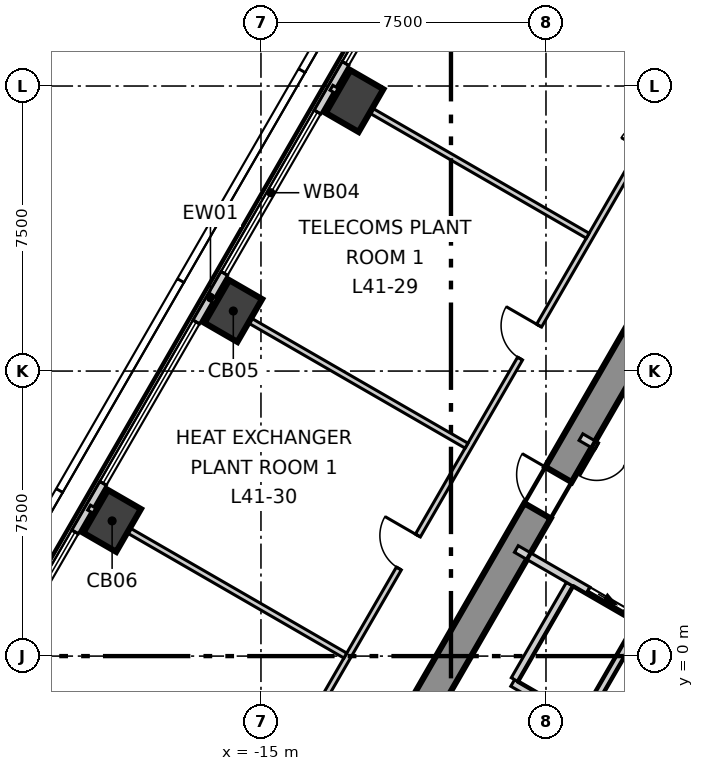
"""IFC4 building model, lengths in metres.
Left out: names, types, materials, properties, quantities, classifications, styles, units other than length and angle.
Written with IfcOpenShell. Run it as: python <this file> out.ifc"""

import sys

from ifc_helpers import new_model, si_unit, direction, frame, frame_2d, origin, origin_2d, place, context, subcontext, project, spatial, polyline, rectangle, outline, extrude, element, fill, save


model = new_model("IFC4")
c1 = context("Model", 3, precision=1e-05, world=origin(), true_north=direction((0.0, 1.0)))
c2 = subcontext(c1, "Body", "Model", "MODEL_VIEW")
j1 = project(units=[si_unit("LENGTHUNIT", "METRE"), si_unit("PLANEANGLEUNIT", "RADIAN")], contexts=[c1])
p1 = place(None, origin())
s1 = spatial("IfcSite", under=j1, at=p1, CompositionType="ELEMENT")
p2 = place(p1, origin())
s2 = spatial("IfcBuilding", under=s1, at=p2, CompositionType="ELEMENT")
p3 = place(p2, frame((0.0, 0.0, 176.3)))
s3 = spatial("IfcBuildingStorey", under=s2, at=p3, CompositionType="ELEMENT", Elevation=176.3)
p4 = place(p3, frame((-1.674, 14.3, -0.3), z_axis=(0.0, 0.0, 1.0), x_axis=(-0.499995765644, -0.866027848477, 0.0)))
e1 = element("IfcWall", 1, at=p4, inside=s3, PredefinedType="SHEAR", context=c2, shape_type="SweptSolid", body=[
    extrude(outline(polyline([(-0.231, -0.4), (1.732, -0.4), (3.695, -0.4), (5.658, -0.4), (7.621, -0.4), (9.584, -0.4), (11.547, -0.4), (13.51, -0.4), (15.473, -0.4), (17.436, -0.4), (19.399, -0.4), (21.362, -0.4), (23.325, -0.4), (22.863, 0.4), (20.977, 0.4), (19.091, 0.4), (17.205, 0.4), (15.319, 0.4), (13.433, 0.4), (11.547, 0.4), (9.661, 0.4), (7.775, 0.4), (5.889, 0.4), (4.003, 0.4), (2.117, 0.4), (0.231, 0.4), (-0.231, -0.4)])), origin(), (0.0, 0.0, 1.0), 4.2),
])
p5 = place(p4, frame((10.997, 0.0, 0.3)))
e2 = element("IfcOpeningElement", 2, at=p5, cuts=e1, PredefinedType="OPENING", context=c2, shape_type="SweptSolid", body=[
    extrude(rectangle(XDim=1.1, YDim=2.1, at=frame_2d((0.55, 1.05))), frame((0.0, 0.41, 0.0), z_axis=(0.0, -1.0, 0.0), x_axis=(1.0, 0.0, 0.0)), (0.0, 0.0, 1.0), 0.82),
])
for number, where, z_axis, x_axis in (
    (3, (-12.538, 14.604, -0.3), (0.0, 0.0, 1.0), (0.5, 0.866, 0.0)),
    (4, (-15.728, 9.08, -0.3), (0.0, 0.0, 1.0), (0.5, 0.866, 0.0)),
    (5, (-18.917, 3.557, -0.3), (0.0, 0.0, 1.0), (0.5, 0.866, 0.0)),
):
    element("IfcColumn", number, at=place(p3, frame(where, z_axis=z_axis, x_axis=x_axis)), inside=s3, PredefinedType="COLUMN", context=c2, shape_type="SweptSolid", body=[
        extrude(rectangle(XDim=1.3, YDim=1.0, at=origin_2d()), origin(), (0.0, 0.0, 1.0), 4.2),
    ])
p6 = place(p3, frame((-2.926, 32.654, 0.0), z_axis=(0.0, 0.0, 1.0), x_axis=(-0.499994049952, -0.866028839019, 0.0)))
e6 = element("IfcWall", 6, at=p6, inside=s3, PredefinedType="ELEMENTEDWALL", context=c2, shape_type="SweptSolid", body=[
    extrude(rectangle(XDim=53.613, YDim=0.2, at=frame_2d((26.806, 0.0))), origin(), (0.0, 0.0, 1.0), 3.9),
])
p7 = place(p6, frame((2.042, 0.0, 0.9)))
e7 = element("IfcOpeningElement", 7, at=p7, cuts=e6, PredefinedType="OPENING", context=c2, shape_type="SweptSolid", body=[
    extrude(rectangle(XDim=4.9, YDim=2.5, at=frame_2d((2.45, 1.25))), frame((0.0, 0.11, 0.0), z_axis=(0.0, -1.0, 0.0), x_axis=(1.0, 0.0, 0.0)), (0.0, 0.0, 1.0), 0.22),
])
p8 = place(p6, frame((8.42, 0.0, 0.9)))
e8 = element("IfcOpeningElement", 8, at=p8, cuts=e6, PredefinedType="OPENING", context=c2, shape_type="SweptSolid", body=[
    extrude(rectangle(XDim=4.9, YDim=2.5, at=frame_2d((2.45, 1.25))), frame((0.0, 0.11, 0.0), z_axis=(0.0, -1.0, 0.0), x_axis=(1.0, 0.0, 0.0)), (0.0, 0.0, 1.0), 0.22),
])
p9 = place(p6, frame((14.798, 0.0, 0.9)))
e9 = element("IfcOpeningElement", 9, at=p9, cuts=e6, PredefinedType="OPENING", context=c2, shape_type="SweptSolid", body=[
    extrude(rectangle(XDim=4.9, YDim=2.5, at=frame_2d((2.45, 1.25))), frame((0.0, 0.11, 0.0), z_axis=(0.0, -1.0, 0.0), x_axis=(1.0, 0.0, 0.0)), (0.0, 0.0, 1.0), 0.22),
])
p10 = place(p6, frame((21.177, 0.0, 0.9)))
e10 = element("IfcOpeningElement", 10, at=p10, cuts=e6, PredefinedType="OPENING", context=c2, shape_type="SweptSolid", body=[
    extrude(rectangle(XDim=4.9, YDim=2.5, at=frame_2d((2.45, 1.25))), frame((0.0, 0.11, 0.0), z_axis=(0.0, -1.0, 0.0), x_axis=(1.0, 0.0, 0.0)), (0.0, 0.0, 1.0), 0.22),
])
p11 = place(p6, frame((27.555, 0.0, 0.9)))
e11 = element("IfcOpeningElement", 11, at=p11, cuts=e6, PredefinedType="OPENING", context=c2, shape_type="SweptSolid", body=[
    extrude(rectangle(XDim=4.9, YDim=2.5, at=frame_2d((2.45, 1.25))), frame((0.0, 0.11, 0.0), z_axis=(0.0, -1.0, 0.0), x_axis=(1.0, 0.0, 0.0)), (0.0, 0.0, 1.0), 0.22),
])
p12 = place(p6, frame((33.934, 0.0, 0.9)))
e12 = element("IfcOpeningElement", 12, at=p12, cuts=e6, PredefinedType="OPENING", context=c2, shape_type="SweptSolid", body=[
    extrude(rectangle(XDim=4.9, YDim=2.5, at=frame_2d((2.45, 1.25))), frame((0.0, 0.11, 0.0), z_axis=(0.0, -1.0, 0.0), x_axis=(1.0, 0.0, 0.0)), (0.0, 0.0, 1.0), 0.22),
])
p13 = place(p6, frame((40.312, 0.0, 0.9)))
e13 = element("IfcOpeningElement", 13, at=p13, cuts=e6, PredefinedType="OPENING", context=c2, shape_type="SweptSolid", body=[
    extrude(rectangle(XDim=4.9, YDim=2.5, at=frame_2d((2.45, 1.25))), frame((0.0, 0.11, 0.0), z_axis=(0.0, -1.0, 0.0), x_axis=(1.0, 0.0, 0.0)), (0.0, 0.0, 1.0), 0.22),
])
p14 = place(p6, frame((46.69, 0.0, 0.9)))
e14 = element("IfcOpeningElement", 14, at=p14, cuts=e6, PredefinedType="OPENING", context=c2, shape_type="SweptSolid", body=[
    extrude(rectangle(XDim=4.9, YDim=2.5, at=frame_2d((2.45, 1.25))), frame((0.0, 0.11, 0.0), z_axis=(0.0, -1.0, 0.0), x_axis=(1.0, 0.0, 0.0)), (0.0, 0.0, 1.0), 0.22),
])
p15 = place(p3, frame((-15.993, -5.7, 0.0), z_axis=(0.0, 0.0, 1.0), x_axis=(0.500007877715, 0.866020855536, 0.0)))
e15 = element("IfcWall", 15, at=p15, inside=s3, PredefinedType="PARTITIONING", context=c2, shape_type="SweptSolid", body=[
    extrude(rectangle(XDim=25.865, YDim=0.15, at=frame_2d((12.933, 0.0))), origin(), (0.0, 0.0, 1.0), 3.9),
])
p16 = place(p15, frame((21.988, 0.0, 0.0)))
e16 = element("IfcOpeningElement", 16, at=p16, cuts=e15, PredefinedType="OPENING", context=c2, shape_type="SweptSolid", body=[
    extrude(rectangle(XDim=1.2, YDim=2.1, at=frame_2d((0.6, 1.05))), frame((0.0, 0.085, 0.0), z_axis=(0.0, -1.0, 0.0), x_axis=(1.0, 0.0, 0.0)), (0.0, 0.0, 1.0), 0.17),
])
p17 = place(p15, frame((15.622, 0.0, 0.0)))
e17 = element("IfcOpeningElement", 17, at=p17, cuts=e15, PredefinedType="OPENING", context=c2, shape_type="SweptSolid", body=[
    extrude(rectangle(XDim=1.0, YDim=2.1, at=frame_2d((0.5, 1.05))), frame((0.0, 0.085, 0.0), z_axis=(0.0, -1.0, 0.0), x_axis=(1.0, 0.0, 0.0)), (0.0, 0.0, 1.0), 0.17),
])
p18 = place(p15, frame((9.244, 0.0, 0.0)))
e18 = element("IfcOpeningElement", 18, at=p18, cuts=e15, PredefinedType="OPENING", context=c2, shape_type="SweptSolid", body=[
    extrude(rectangle(XDim=1.0, YDim=2.1, at=frame_2d((0.5, 1.05))), frame((0.0, 0.085, 0.0), z_axis=(0.0, -1.0, 0.0), x_axis=(1.0, 0.0, 0.0)), (0.0, 0.0, 1.0), 0.17),
])
p19 = place(p15, frame((2.678, 0.0, 0.0)))
e19 = element("IfcOpeningElement", 19, at=p19, cuts=e15, PredefinedType="OPENING", context=c2, shape_type="SweptSolid", body=[
    extrude(rectangle(XDim=1.2, YDim=2.1, at=frame_2d((0.6, 1.05))), frame((0.0, 0.085, 0.0), z_axis=(0.0, -1.0, 0.0), x_axis=(1.0, 0.0, 0.0)), (0.0, 0.0, 1.0), 0.17),
])
p20 = place(p3, frame((-19.523, 3.907, 0.0), z_axis=(0.0, 0.0, 1.0), x_axis=(0.866023191782, -0.500003831281, 0.0)))
e20 = element("IfcWall", 20, at=p20, inside=s3, PredefinedType="PARTITIONING", context=c2, shape_type="SweptSolid", body=[
    extrude(rectangle(XDim=7.786, YDim=0.15, at=frame_2d((3.893, 0.0))), origin(), (0.0, 0.0, 1.0), 3.9),
])
p21 = place(p3, frame((-16.334, 9.43, 0.0), z_axis=(0.0, 0.0, 1.0), x_axis=(0.86603676932, -0.499980313799, 0.0)))
e21 = element("IfcWall", 21, at=p21, inside=s3, PredefinedType="PARTITIONING", context=c2, shape_type="SweptSolid", body=[
    extrude(rectangle(XDim=7.786, YDim=0.15, at=frame_2d((3.893, 0.0))), origin(), (0.0, 0.0, 1.0), 3.4),
])
p22 = place(p3, frame((-13.145, 14.954, 0.0), z_axis=(0.0, 0.0, 1.0), x_axis=(0.866023191782, -0.500003831281, 0.0)))
e22 = element("IfcWall", 22, at=p22, inside=s3, PredefinedType="PARTITIONING", context=c2, shape_type="SweptSolid", body=[
    extrude(rectangle(XDim=7.786, YDim=0.15, at=frame_2d((3.893, 0.0))), origin(), (0.0, 0.0, 1.0), 3.9),
])
p23 = place(p3, frame((-8.376, -0.707, 0.0), z_axis=(0.0, 0.0, 1.0), x_axis=(0.866067520717, -0.499927044236, 0.0)))
e23 = element("IfcWall", 23, at=p23, inside=s3, PredefinedType="SOLIDWALL", context=c2, shape_type="SweptSolid", body=[
    extrude(rectangle(XDim=2.1, YDim=0.2, at=frame_2d((1.05, 0.0))), origin(), (0.0, 0.0, 1.0), 3.9),
])
p24 = place(p3, frame((-8.326, -0.62, 0.0), z_axis=(0.0, 0.0, 1.0), x_axis=(0.500023687443, 0.866011727401, 0.0)))
e24 = element("IfcWall", 24, at=p24, inside=s3, PredefinedType="SOLIDWALL", context=c2, shape_type="SweptSolid", body=[
    extrude(rectangle(XDim=2.9, YDim=0.2, at=frame_2d((1.45, 0.0))), origin(), (0.0, 0.0, 1.0), 3.9),
])
p25 = place(p3, frame((-8.28, 2.818, 0.0), z_axis=(0.0, 0.0, 1.0), x_axis=(0.86600175068, -0.50004096614, 0.0)))
e25 = element("IfcWall", 25, at=p25, inside=s3, PredefinedType="SOLIDWALL", context=c2, shape_type="SweptSolid", body=[
    extrude(rectangle(XDim=3.782, YDim=0.2, at=frame_2d((1.891, 0.0))), origin(), (0.0, 0.0, 1.0), 3.9),
])
p26 = place(p25, frame((2.18, 0.0, 0.0)))
e26 = element("IfcOpeningElement", 26, at=p26, cuts=e25, PredefinedType="OPENING", context=c2, shape_type="SweptSolid", body=[
    extrude(rectangle(XDim=1.1, YDim=2.1, at=frame_2d((0.55, 1.05))), frame((0.0, 0.11, 0.0), z_axis=(0.0, -1.0, 0.0), x_axis=(1.0, 0.0, 0.0)), (0.0, 0.0, 1.0), 0.22),
])
p27 = place(p3, frame((-6.58, 5.762, 0.0), z_axis=(0.0, 0.0, 1.0), x_axis=(0.866029704776, -0.49999255039, 0.0)))
e27 = element("IfcWall", 27, at=p27, inside=s3, PredefinedType="SOLIDWALL", context=c2, shape_type="SweptSolid", body=[
    extrude(rectangle(XDim=3.782, YDim=0.2, at=frame_2d((1.891, 0.0))), origin(), (0.0, 0.0, 1.0), 3.9),
])
p28 = place(p27, frame((2.279, 0.0, 0.0)))
e28 = element("IfcOpeningElement", 28, at=p28, cuts=e27, PredefinedType="OPENING", context=c2, shape_type="SweptSolid", body=[
    extrude(rectangle(XDim=0.9, YDim=2.1, at=frame_2d((0.45, 1.05))), frame((0.0, 0.11, 0.0), z_axis=(0.0, -1.0, 0.0), x_axis=(1.0, 0.0, 0.0)), (0.0, 0.0, 1.0), 0.22),
])
p29 = place(p27, frame((0.479, 0.0, 0.0)))
e29 = element("IfcOpeningElement", 29, at=p29, cuts=e27, PredefinedType="OPENING", context=c2, shape_type="SweptSolid", body=[
    extrude(rectangle(XDim=0.9, YDim=2.1, at=frame_2d((0.45, 1.05))), frame((0.0, 0.11, 0.0), z_axis=(0.0, -1.0, 0.0), x_axis=(1.0, 0.0, 0.0)), (0.0, 0.0, 1.0), 0.22),
])
p30 = place(p3, frame((-6.507, -1.67, 0.0), z_axis=(0.0, 0.0, 1.0), x_axis=(0.50012328804, 0.865954211699, 0.0)))
e30 = element("IfcWall", 30, at=p30, inside=s3, PredefinedType="SOLIDWALL", context=c2, shape_type="SweptSolid", body=[
    extrude(rectangle(XDim=2.9, YDim=0.2, at=frame_2d((1.45, 0.0))), origin(), (0.0, 0.0, 1.0), 3.9),
])
p31 = place(p9, origin())
e31 = element("IfcWindow", 31, at=p31, inside=s3, PartitioningType="SINGLE_PANEL", PredefinedType="WINDOW", context=c2, shape_type="SweptSolid", body=[
    extrude(rectangle(XDim=4.9, YDim=2.5, at=frame_2d((2.45, 1.25))), frame((0.0, 0.03, 0.0), z_axis=(0.0, -1.0, 0.0), x_axis=(1.0, 0.0, 0.0)), (0.0, 0.0, 1.0), 0.06),
])
fill(e9, e31)
p32 = place(p10, origin())
e32 = element("IfcWindow", 32, at=p32, inside=s3, PartitioningType="SINGLE_PANEL", PredefinedType="WINDOW", context=c2, shape_type="SweptSolid", body=[
    extrude(rectangle(XDim=4.9, YDim=2.5, at=frame_2d((2.45, 1.25))), frame((0.0, 0.03, 0.0), z_axis=(0.0, -1.0, 0.0), x_axis=(1.0, 0.0, 0.0)), (0.0, 0.0, 1.0), 0.06),
])
fill(e10, e32)
p33 = place(p11, origin())
e33 = element("IfcWindow", 33, at=p33, inside=s3, PartitioningType="SINGLE_PANEL", PredefinedType="WINDOW", context=c2, shape_type="SweptSolid", body=[
    extrude(rectangle(XDim=4.9, YDim=2.5, at=frame_2d((2.45, 1.25))), frame((0.0, 0.03, 0.0), z_axis=(0.0, -1.0, 0.0), x_axis=(1.0, 0.0, 0.0)), (0.0, 0.0, 1.0), 0.06),
])
fill(e11, e33)
p34 = place(p12, origin())
e34 = element("IfcWindow", 34, at=p34, inside=s3, PartitioningType="SINGLE_PANEL", PredefinedType="WINDOW", context=c2, shape_type="SweptSolid", body=[
    extrude(rectangle(XDim=4.9, YDim=2.5, at=frame_2d((2.45, 1.25))), frame((0.0, 0.03, 0.0), z_axis=(0.0, -1.0, 0.0), x_axis=(1.0, 0.0, 0.0)), (0.0, 0.0, 1.0), 0.06),
])
fill(e12, e34)
p35 = place(p26, origin())
e35 = element("IfcDoor", 35, at=p35, inside=s3, OperationType="SLIDING_TO_LEFT", PredefinedType="DOOR", context=c2, shape_type="SweptSolid", body=[
    extrude(rectangle(XDim=1.1, YDim=2.1, at=frame_2d((0.55, 1.05))), frame((0.0, 0.025, 0.0), z_axis=(0.0, -1.0, 0.0), x_axis=(1.0, 0.0, 0.0)), (0.0, 0.0, 1.0), 0.05),
])
fill(e26, e35)
p36 = place(p17, origin())
e36 = element("IfcDoor", 36, at=p36, inside=s3, OperationType="SINGLE_SWING_LEFT", PredefinedType="DOOR", context=c2, shape_type="SweptSolid", body=[
    extrude(rectangle(XDim=1.0, YDim=2.1, at=frame_2d((0.5, 1.05))), frame((0.0, 0.025, 0.0), z_axis=(0.0, -1.0, 0.0), x_axis=(1.0, 0.0, 0.0)), (0.0, 0.0, 1.0), 0.05),
])
fill(e17, e36)
p37 = place(p18, origin())
e37 = element("IfcDoor", 37, at=p37, inside=s3, OperationType="SINGLE_SWING_LEFT", PredefinedType="DOOR", context=c2, shape_type="SweptSolid", body=[
    extrude(rectangle(XDim=1.0, YDim=2.1, at=frame_2d((0.5, 1.05))), frame((0.0, 0.025, 0.0), z_axis=(0.0, -1.0, 0.0), x_axis=(1.0, 0.0, 0.0)), (0.0, 0.0, 1.0), 0.05),
])
fill(e18, e37)
p38 = place(p5, origin())
e38 = element("IfcDoor", 38, at=p38, inside=s3, OperationType="SINGLE_SWING_LEFT", PredefinedType="DOOR", context=c2, shape_type="SweptSolid", body=[
    extrude(rectangle(XDim=1.1, YDim=2.1, at=frame_2d((0.55, 1.05))), frame((0.0, 0.025, 0.0), z_axis=(0.0, -1.0, 0.0), x_axis=(1.0, 0.0, 0.0)), (0.0, 0.0, 1.0), 0.05),
])
fill(e2, e38)
p39 = place(p29, origin())
e39 = element("IfcDoor", 39, at=p39, inside=s3, OperationType="SINGLE_SWING_LEFT", PredefinedType="DOOR", context=c2, shape_type="SweptSolid", body=[
    extrude(rectangle(XDim=0.9, YDim=2.1, at=frame_2d((0.45, 1.05))), frame((0.0, 0.025, 0.0), z_axis=(0.0, -1.0, 0.0), x_axis=(1.0, 0.0, 0.0)), (0.0, 0.0, 1.0), 0.05),
])
fill(e29, e39)
save(model, sys.argv[1])
